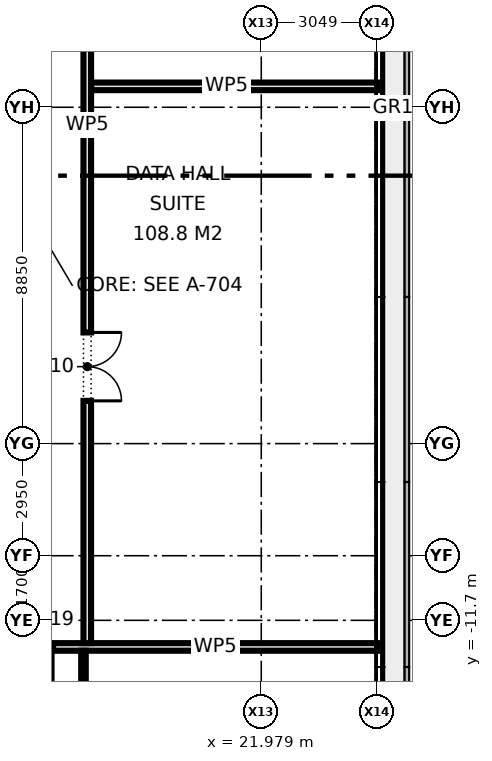
"""IFC4 building model, lengths in metres.
Left out: names, types, materials, properties, quantities, classifications, styles, units other than length and angle.
Written with IfcOpenShell. Run it as: python <this file> out.ifc"""

import sys

from ifc_helpers import new_model, si_unit, direction, frame, frame_2d, origin, place, context, subcontext, project, spatial, rectangle, extrude, element, fill, save


model = new_model("IFC4")
c1 = context("Model", 3, precision=1e-05, world=origin(), true_north=direction((0.0, 1.0)))
c2 = subcontext(c1, "Body", "Model", "MODEL_VIEW")
j1 = project(units=[si_unit("LENGTHUNIT", "METRE"), si_unit("PLANEANGLEUNIT", "RADIAN")], contexts=[c1])
p1 = place(None, origin())
s1 = spatial("IfcSite", under=j1, at=p1, CompositionType="ELEMENT")
p2 = place(p1, origin())
s2 = spatial("IfcBuilding", under=s1, at=p2, CompositionType="ELEMENT")
p3 = place(p2, frame((0.0, 0.0, 11.3)))
s3 = spatial("IfcBuildingStorey", under=s2, at=p3, CompositionType="ELEMENT", Elevation=11.3)
p4 = place(p3, frame((1.4, -12.4, 0.0), z_axis=(0.0, 0.0, 1.0), x_axis=(1.0, 0.0, 0.0)))
e1 = element("IfcWall", 1, at=p4, inside=s3, PredefinedType="PARTITIONING", context=c2, shape_type="SweptSolid", body=[
    extrude(rectangle(XDim=23.63, YDim=0.2, at=frame_2d((11.815, 0.0))), origin(), (0.0, 0.0, 1.0), 4.575),
])
p5 = place(p4, frame((7.4, 0.0, 0.0)))
e2 = element("IfcOpeningElement", 2, at=p5, cuts=e1, PredefinedType="OPENING", context=c2, shape_type="SweptSolid", body=[
    extrude(rectangle(XDim=1.0, YDim=2.1, at=frame_2d((0.5, 1.05))), frame((0.0, 0.11, 0.0), z_axis=(0.0, -1.0, 0.0), x_axis=(1.0, 0.0, 0.0)), (0.0, 0.0, 1.0), 0.22),
])
p6 = place(p4, frame((11.0, 0.0, 0.0)))
e3 = element("IfcOpeningElement", 3, at=p6, cuts=e1, PredefinedType="OPENING", context=c2, shape_type="SweptSolid", body=[
    extrude(rectangle(XDim=1.0, YDim=2.1, at=frame_2d((0.5, 1.05))), frame((0.0, 0.11, 0.0), z_axis=(0.0, -1.0, 0.0), x_axis=(1.0, 0.0, 0.0)), (0.0, 0.0, 1.0), 0.22),
])
p7 = place(p4, frame((14.1, 0.0, 0.0)))
e4 = element("IfcOpeningElement", 4, at=p7, cuts=e1, PredefinedType="OPENING", context=c2, shape_type="SweptSolid", body=[
    extrude(rectangle(XDim=1.0, YDim=2.1, at=frame_2d((0.5, 1.05))), frame((0.0, 0.11, 0.0), z_axis=(0.0, -1.0, 0.0), x_axis=(1.0, 0.0, 0.0)), (0.0, 0.0, 1.0), 0.22),
])
p8 = place(p3, frame((17.5, 2.35, 0.0), z_axis=(0.0, 0.0, 1.0), x_axis=(1.0, 0.0, 0.0)))
e5 = element("IfcWall", 5, at=p8, inside=s3, PredefinedType="PARTITIONING", context=c2, shape_type="SweptSolid", body=[
    extrude(rectangle(XDim=7.53, YDim=0.2, at=frame_2d((3.765, 0.0))), origin(), (0.0, 0.0, 1.0), 4.575),
])
p9 = place(p3, frame((17.4, -12.3, 0.0), z_axis=(0.0, 0.0, 1.0), x_axis=(0.0, 1.0, 0.0)))
e6 = element("IfcWall", 6, at=p9, inside=s3, PredefinedType="PARTITIONING", context=c2, shape_type="SweptSolid", body=[
    extrude(rectangle(XDim=24.6, YDim=0.2, at=frame_2d((12.3, 0.0))), origin(), (0.0, 0.0, 1.0), 4.575),
])
p10 = place(p9, frame((6.375, 0.0, 0.0)))
e7 = element("IfcOpeningElement", 7, at=p10, cuts=e6, PredefinedType="OPENING", context=c2, shape_type="SweptSolid", body=[
    extrude(rectangle(XDim=1.8, YDim=2.1, at=frame_2d((0.9, 1.05))), frame((0.0, 0.11, 0.0), z_axis=(0.0, -1.0, 0.0), x_axis=(1.0, 0.0, 0.0)), (0.0, 0.0, 1.0), 0.22),
])
p11 = place(p9, frame((19.075, 0.0, 0.0)))
e8 = element("IfcOpeningElement", 8, at=p11, cuts=e6, PredefinedType="OPENING", context=c2, shape_type="SweptSolid", body=[
    extrude(rectangle(XDim=1.2, YDim=2.1, at=frame_2d((0.6, 1.05))), frame((0.0, 0.11, 0.0), z_axis=(0.0, -1.0, 0.0), x_axis=(1.0, 0.0, 0.0)), (0.0, 0.0, 1.0), 0.22),
])
p12 = place(p3, frame((17.3, -16.94, 0.0), z_axis=(0.0, 0.0, 1.0), x_axis=(0.0, 1.0, 0.0)))
e9 = element("IfcWall", 9, at=p12, inside=s3, PredefinedType="PARTITIONING", context=c2, shape_type="SweptSolid", body=[
    extrude(rectangle(XDim=4.44, YDim=0.12, at=frame_2d((2.22, 0.0))), origin(), (0.0, 0.0, 1.0), 4.575),
])
p13 = place(p10, frame((1.8, 0.0, 0.0), z_axis=(0.0, 0.0, 1.0), x_axis=(-1.0, 0.0, 0.0)))
e10 = element("IfcDoor", 10, at=p13, inside=s3, OperationType="DOUBLE_DOOR_SINGLE_SWING", PredefinedType="DOOR", context=c2, shape_type="SweptSolid", body=[
    extrude(rectangle(XDim=1.8, YDim=2.1, at=frame_2d((0.9, 1.05))), frame((0.0, 0.025, 0.0), z_axis=(0.0, -1.0, 0.0), x_axis=(1.0, 0.0, 0.0)), (0.0, 0.0, 1.0), 0.05),
])
fill(e7, e10)
save(model, sys.argv[1])
